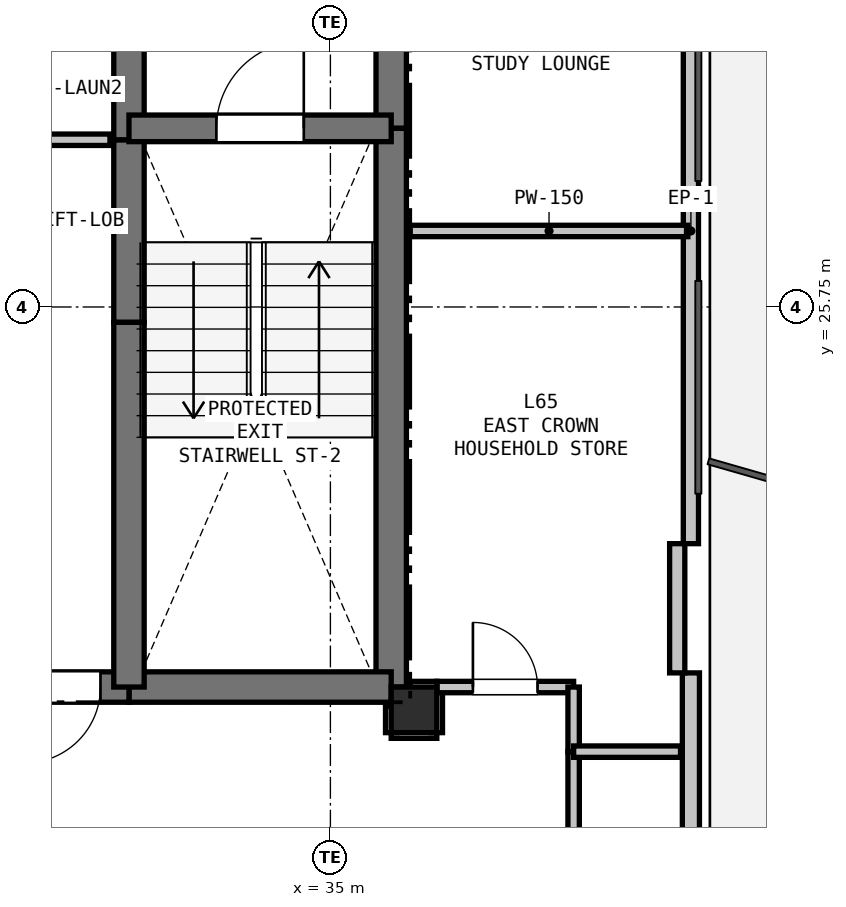
"""IFC4 building model, lengths in metres.
Left out: names, types, materials, properties, quantities, classifications, styles, units other than length and angle.
Written with IfcOpenShell. Run it as: python <this file> out.ifc"""

import sys

from ifc_helpers import new_model, si_unit, direction, frame, frame_2d, origin, origin_2d, place, context, subcontext, project, spatial, rectangle, extrude, element, fill, save


model = new_model("IFC4")
c1 = context("Model", 3, precision=1e-05, world=origin(), true_north=direction((0.0, 1.0)))
c2 = subcontext(c1, "Body", "Model", "MODEL_VIEW")
j1 = project(units=[si_unit("LENGTHUNIT", "METRE"), si_unit("PLANEANGLEUNIT", "RADIAN")], contexts=[c1])
p1 = place(None, origin())
s1 = spatial("IfcSite", under=j1, at=p1, CompositionType="ELEMENT")
p2 = place(p1, origin())
s2 = spatial("IfcBuilding", under=s1, at=p2, CompositionType="ELEMENT")
p3 = place(p2, frame((0.0, 0.0, 233.1)))
s3 = spatial("IfcBuildingStorey", under=s2, at=p3, CompositionType="ELEMENT", Elevation=233.1)
p4 = place(p3, frame((36.1, 20.45, 0.0), z_axis=(0.0, 0.0, 1.0), x_axis=(1.0, 0.0, 0.0)))
e1 = element("IfcColumn", 1, at=p4, inside=s3, PredefinedType="COLUMN", context=c2, shape_type="SweptSolid", body=[
    extrude(rectangle(XDim=0.6, YDim=0.6, at=origin_2d()), origin(), (0.0, 0.0, 1.0), 3.3),
])
p5 = place(p3, frame((39.743, 30.864, 0.0), z_axis=(0.0, 0.0, 1.0), x_axis=(0.0, -1.0, 0.0)))
e2 = element("IfcWall", 2, at=p5, inside=s3, PredefinedType="PARAPET", context=c2, shape_type="SweptSolid", body=[
    extrude(rectangle(XDim=8.228, YDim=0.2, at=frame_2d((4.114, 0.0))), origin(), (0.0, 0.0, 1.0), 0.2),
])
p6 = place(p3, frame((39.743, 20.936, 0.0), z_axis=(0.0, 0.0, 1.0), x_axis=(0.0, -1.0, 0.0)))
e3 = element("IfcWall", 3, at=p6, inside=s3, PredefinedType="SOLIDWALL", context=c2, shape_type="SweptSolid", body=[
    extrude(rectangle(XDim=8.928, YDim=0.225, at=frame_2d((4.464, 0.0))), origin(), (0.0, 0.0, 1.0), 2.7),
])
p7 = place(p6, frame((5.56, 0.0, 0.9)))
e4 = element("IfcOpeningElement", 4, at=p7, cuts=e3, PredefinedType="OPENING", context=c2, shape_type="SweptSolid", body=[
    extrude(rectangle(XDim=1.8, YDim=1.5, at=frame_2d((0.9, 0.75))), frame((0.0, 0.123, 0.0), z_axis=(0.0, -1.0, 0.0), x_axis=(1.0, 0.0, 0.0)), (0.0, 0.0, 1.0), 0.245),
])
p8 = place(p3, frame((39.563, 22.636, 0.0), z_axis=(0.0, 0.0, 1.0), x_axis=(0.0, -1.0, 0.0)))
e5 = element("IfcWall", 5, at=p8, inside=s3, PredefinedType="PARAPET", context=c2, shape_type="SweptSolid", body=[
    extrude(rectangle(XDim=1.7, YDim=0.2, at=frame_2d((0.85, 0.0))), origin(), (0.0, 0.0, 1.0), 2.7),
])
p9 = place(p3, frame((35.8, 32.75, 0.0), z_axis=(0.0, 0.0, 1.0), x_axis=(0.0, -1.0, 0.0)))
e6 = element("IfcWall", 6, at=p9, inside=s3, PredefinedType="SHEAR", context=c2, shape_type="SweptSolid", body=[
    extrude(rectangle(XDim=4.65, YDim=0.4, at=frame_2d((2.325, 0.0))), origin(), (0.0, 0.0, 1.0), 3.08),
])
p10 = place(p3, frame((35.8, 28.1, 0.0), z_axis=(0.0, 0.0, 1.0), x_axis=(0.0, -1.0, 0.0)))
e7 = element("IfcWall", 7, at=p10, inside=s3, PredefinedType="SHEAR", context=c2, shape_type="SweptSolid", body=[
    extrude(rectangle(XDim=7.35, YDim=0.4, at=frame_2d((3.675, 0.0))), origin(), (0.0, 0.0, 1.0), 3.08),
])
p11 = place(p3, frame((35.8, 20.75, 0.0), z_axis=(0.0, 0.0, 1.0), x_axis=(-1.0, 0.0, 0.0)))
e8 = element("IfcWall", 8, at=p11, inside=s3, PredefinedType="SHEAR", context=c2, shape_type="SweptSolid", body=[
    extrude(rectangle(XDim=3.45, YDim=0.4, at=frame_2d((1.725, 0.0))), origin(), (0.0, 0.0, 1.0), 3.08),
])
p12 = place(p3, frame((32.35, 20.75, 0.0), z_axis=(0.0, 0.0, 1.0), x_axis=(-1.0, 0.0, 0.0)))
e9 = element("IfcWall", 9, at=p12, inside=s3, PredefinedType="SHEAR", context=c2, shape_type="SweptSolid", body=[
    extrude(rectangle(XDim=1.75, YDim=0.4, at=frame_2d((0.875, 0.0))), origin(), (0.0, 0.0, 1.0), 3.08),
])
p13 = place(p12, frame((0.375, 0.0, 0.0)))
e10 = element("IfcOpeningElement", 10, at=p13, cuts=e9, PredefinedType="OPENING", context=c2, shape_type="SweptSolid", body=[
    extrude(rectangle(XDim=1.0, YDim=2.15, at=frame_2d((0.5, 1.075))), frame((0.0, 0.21, 0.0), z_axis=(0.0, -1.0, 0.0), x_axis=(1.0, 0.0, 0.0)), (0.0, 0.0, 1.0), 0.42),
])
p14 = place(p3, frame((32.35, 20.75, 0.0), z_axis=(0.0, 0.0, 1.0), x_axis=(0.0, 1.0, 0.0)))
e11 = element("IfcWall", 11, at=p14, inside=s3, PredefinedType="SHEAR", context=c2, shape_type="SweptSolid", body=[
    extrude(rectangle(XDim=4.8, YDim=0.4, at=frame_2d((2.4, 0.0))), origin(), (0.0, 0.0, 1.0), 3.08),
])
p15 = place(p3, frame((32.35, 25.55, 0.0), z_axis=(0.0, 0.0, 1.0), x_axis=(0.0, 1.0, 0.0)))
e12 = element("IfcWall", 12, at=p15, inside=s3, PredefinedType="SHEAR", context=c2, shape_type="SweptSolid", body=[
    extrude(rectangle(XDim=2.4, YDim=0.4, at=frame_2d((1.2, 0.0))), origin(), (0.0, 0.0, 1.0), 3.08),
])
p16 = place(p3, frame((32.35, 27.95, 0.0), z_axis=(0.0, 0.0, 1.0), x_axis=(0.0, 1.0, 0.0)))
e13 = element("IfcWall", 13, at=p16, inside=s3, PredefinedType="SHEAR", context=c2, shape_type="SweptSolid", body=[
    extrude(rectangle(XDim=2.8, YDim=0.4, at=frame_2d((1.4, 0.0))), origin(), (0.0, 0.0, 1.0), 3.08),
])
p17 = place(p3, frame((32.35, 28.1, 0.0), z_axis=(0.0, 0.0, 1.0), x_axis=(1.0, 0.0, 0.0)))
e14 = element("IfcWall", 14, at=p17, inside=s3, PredefinedType="SHEAR", context=c2, shape_type="SweptSolid", body=[
    extrude(rectangle(XDim=3.45, YDim=0.35, at=frame_2d((1.725, 0.0))), origin(), (0.0, 0.0, 1.0), 3.08),
])
p18 = place(p17, frame((1.15, 0.0, 0.0)))
e15 = element("IfcOpeningElement", 15, at=p18, cuts=e14, PredefinedType="OPENING", context=c2, shape_type="SweptSolid", body=[
    extrude(rectangle(XDim=1.15, YDim=2.15, at=frame_2d((0.575, 1.075))), frame((0.0, 0.185, 0.0), z_axis=(0.0, -1.0, 0.0), x_axis=(1.0, 0.0, 0.0)), (0.0, 0.0, 1.0), 0.37),
])
p19 = place(p3, frame((27.4, 27.95, 0.0), z_axis=(0.0, 0.0, 1.0), x_axis=(1.0, 0.0, 0.0)))
e16 = element("IfcWall", 16, at=p19, inside=s3, PredefinedType="PARTITIONING", context=c2, shape_type="SweptSolid", body=[
    extrude(rectangle(XDim=4.7, YDim=0.15, at=frame_2d((2.35, 0.0))), origin(), (0.0, 0.0, 1.0), 3.08),
])
p20 = place(p19, frame((1.85, 0.0, 0.0)))
e17 = element("IfcOpeningElement", 17, at=p20, cuts=e16, PredefinedType="OPENING", context=c2, shape_type="SweptSolid", body=[
    extrude(rectangle(XDim=1.0, YDim=2.15, at=frame_2d((0.5, 1.075))), frame((0.0, 0.085, 0.0), z_axis=(0.0, -1.0, 0.0), x_axis=(1.0, 0.0, 0.0)), (0.0, 0.0, 1.0), 0.17),
])
p21 = place(p3, frame((35.8, 20.15, 0.0), z_axis=(0.0, 0.0, 1.0), x_axis=(1.0, 0.0, 0.0)))
e18 = element("IfcWall", 18, at=p21, inside=s3, PredefinedType="PARTITIONING", context=c2, shape_type="SweptSolid", body=[
    extrude(rectangle(XDim=0.6, YDim=0.15, at=frame_2d((0.3, 0.0))), origin(), (0.0, 0.0, 1.0), 2.528),
])
p22 = place(p3, frame((36.4, 20.15, 0.0), z_axis=(0.0, 0.0, 1.0), x_axis=(0.0, 1.0, 0.0)))
e19 = element("IfcWall", 19, at=p22, inside=s3, PredefinedType="PARTITIONING", context=c2, shape_type="SweptSolid", body=[
    extrude(rectangle(XDim=0.6, YDim=0.15, at=frame_2d((0.3, 0.0))), origin(), (0.0, 0.0, 1.0), 3.08),
])
p23 = place(p3, frame((36.4, 20.75, 0.0), z_axis=(0.0, 0.0, 1.0), x_axis=(1.0, 0.0, 0.0)))
e20 = element("IfcWall", 20, at=p23, inside=s3, PredefinedType="PARTITIONING", context=c2, shape_type="SweptSolid", body=[
    extrude(rectangle(XDim=1.8, YDim=0.15, at=frame_2d((0.9, 0.0))), origin(), (0.0, 0.0, 1.0), 3.08),
])
p24 = place(p23, frame((0.475, 0.0, 0.0)))
e21 = element("IfcOpeningElement", 21, at=p24, cuts=e20, PredefinedType="OPENING", context=c2, shape_type="SweptSolid", body=[
    extrude(rectangle(XDim=0.85, YDim=2.1, at=frame_2d((0.425, 1.05))), frame((0.0, 0.085, 0.0), z_axis=(0.0, -1.0, 0.0), x_axis=(1.0, 0.0, 0.0)), (0.0, 0.0, 1.0), 0.17),
])
p25 = place(p3, frame((38.2, 20.75, 0.0), z_axis=(0.0, 0.0, 1.0), x_axis=(0.0, -1.0, 0.0)))
e22 = element("IfcWall", 22, at=p25, inside=s3, PredefinedType="PARTITIONING", context=c2, shape_type="SweptSolid", body=[
    extrude(rectangle(XDim=0.85, YDim=0.15, at=frame_2d((0.425, 0.0))), origin(), (0.0, 0.0, 1.0), 3.08),
])
p26 = place(p3, frame((38.2, 19.9, 0.0), z_axis=(0.0, 0.0, 1.0), x_axis=(0.0, -1.0, 0.0)))
e23 = element("IfcWall", 23, at=p26, inside=s3, PredefinedType="PARTITIONING", context=c2, shape_type="SweptSolid", body=[
    extrude(rectangle(XDim=1.6, YDim=0.15, at=frame_2d((0.8, 0.0))), origin(), (0.0, 0.0, 1.0), 3.08),
])
p27 = place(p3, frame((35.8, 20.5, 0.0), z_axis=(0.0, 0.0, 1.0), x_axis=(0.0, -1.0, 0.0)))
e24 = element("IfcWall", 24, at=p27, inside=s3, PredefinedType="PARTITIONING", context=c2, shape_type="SweptSolid", body=[
    extrude(rectangle(XDim=0.35, YDim=0.15, at=frame_2d((0.175, 0.0))), origin(), (0.0, 0.0, 1.0), 2.605),
])
p28 = place(p3, frame((39.703, 26.75, 0.0), z_axis=(0.0, 0.0, 1.0), x_axis=(-1.0, 0.0, 0.0)))
e25 = element("IfcWall", 25, at=p28, inside=s3, PredefinedType="PARTITIONING", context=c2, shape_type="SweptSolid", body=[
    extrude(rectangle(XDim=3.653, YDim=0.15, at=frame_2d((1.826, 0.0))), origin(), (0.0, 0.0, 1.0), 2.365),
])
p29 = place(p3, frame((36.4, 20.75, 0.0), z_axis=(0.0, 0.0, 1.0), x_axis=(-1.0, 0.0, 0.0)))
e26 = element("IfcWall", 26, at=p29, inside=s3, PredefinedType="PARTITIONING", context=c2, shape_type="SweptSolid", body=[
    extrude(rectangle(XDim=0.35, YDim=0.15, at=frame_2d((0.175, 0.0))), origin(), (0.0, 0.0, 1.0), 2.605),
])
p30 = place(p3, frame((39.606, 19.9, 0.0), z_axis=(0.0, 0.0, 1.0), x_axis=(-1.0, 0.0, 0.0)))
e27 = element("IfcWall", 27, at=p30, inside=s3, PredefinedType="PARTITIONING", context=c2, shape_type="SweptSolid", body=[
    extrude(rectangle(XDim=1.406, YDim=0.15, at=frame_2d((0.703, 0.0))), origin(), (0.0, 0.0, 1.0), 2.365),
])
p31 = place(p13, origin())
e28 = element("IfcDoor", 28, at=p31, inside=s3, OperationType="SINGLE_SWING_RIGHT", PredefinedType="DOOR", context=c2, shape_type="SweptSolid", body=[
    extrude(rectangle(XDim=1.0, YDim=2.15, at=frame_2d((0.5, 1.075))), frame((0.0, 0.025, 0.0), z_axis=(0.0, -1.0, 0.0), x_axis=(1.0, 0.0, 0.0)), (0.0, 0.0, 1.0), 0.05),
])
fill(e10, e28)
p32 = place(p18, origin())
e29 = element("IfcDoor", 29, at=p32, inside=s3, OperationType="SINGLE_SWING_RIGHT", PredefinedType="DOOR", context=c2, shape_type="SweptSolid", body=[
    extrude(rectangle(XDim=1.15, YDim=2.15, at=frame_2d((0.575, 1.075))), frame((0.0, 0.025, 0.0), z_axis=(0.0, -1.0, 0.0), x_axis=(1.0, 0.0, 0.0)), (0.0, 0.0, 1.0), 0.05),
])
fill(e15, e29)
p33 = place(p24, origin())
e30 = element("IfcDoor", 30, at=p33, inside=s3, OperationType="SINGLE_SWING_LEFT", PredefinedType="DOOR", context=c2, shape_type="SweptSolid", body=[
    extrude(rectangle(XDim=0.85, YDim=2.1, at=frame_2d((0.425, 1.05))), frame((0.0, 0.025, 0.0), z_axis=(0.0, -1.0, 0.0), x_axis=(1.0, 0.0, 0.0)), (0.0, 0.0, 1.0), 0.05),
])
fill(e21, e30)
save(model, sys.argv[1])
